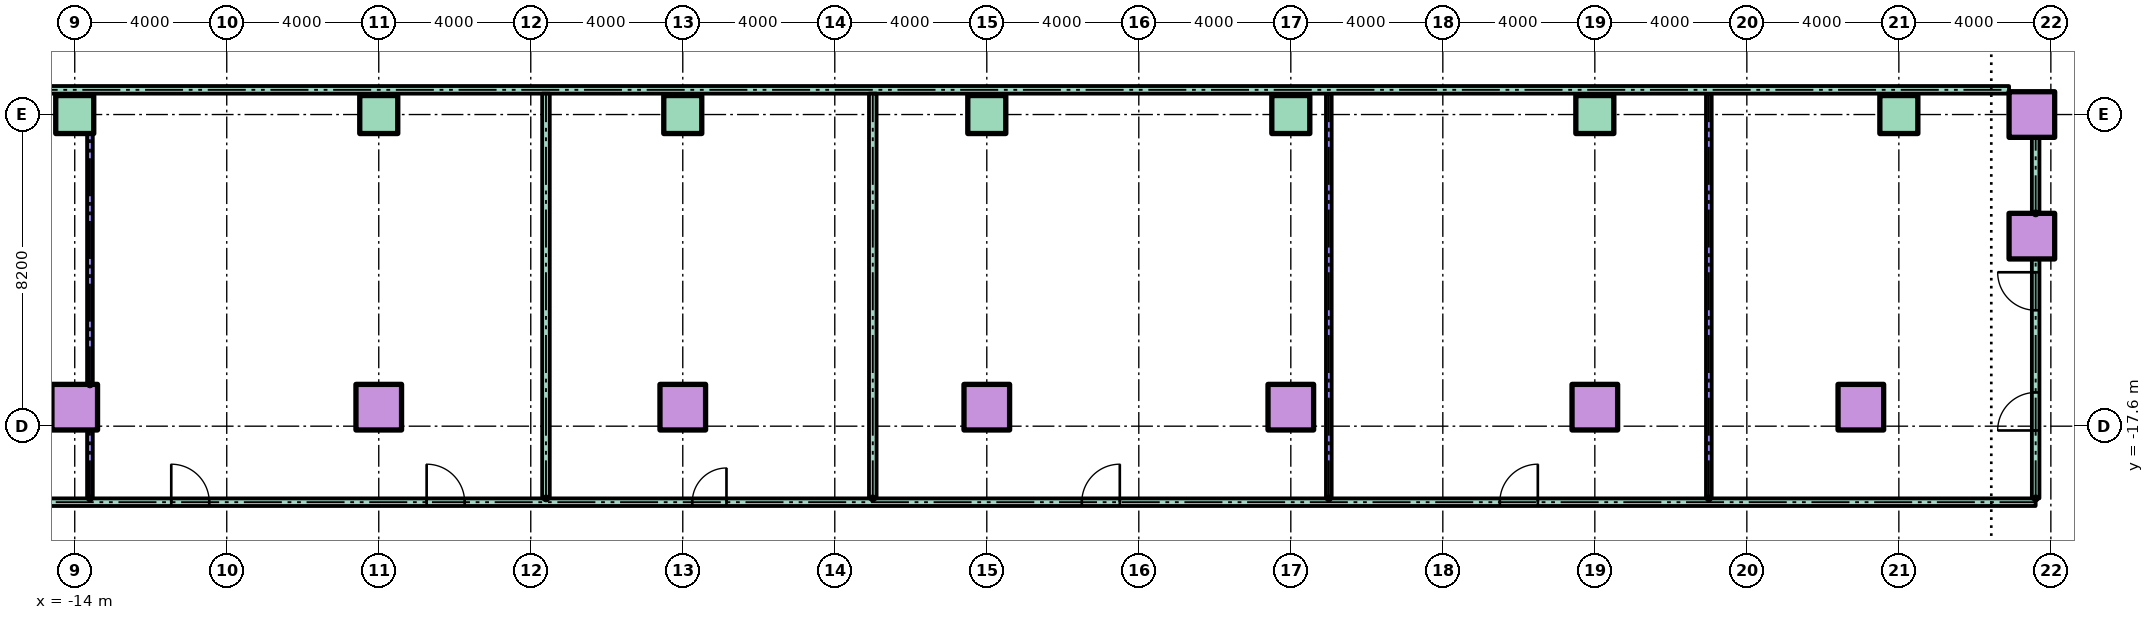
"""IFC4 building model, lengths in metres.
Left out: names, types, materials, properties, quantities, classifications, styles, units other than length and angle.
Written with IfcOpenShell. Run it as: python <this file> out.ifc"""

import sys

from ifc_helpers import new_model, si_unit, direction, frame, frame_2d, origin, origin_2d, place, context, subcontext, project, spatial, rectangle, hollow_rectangle, extrude, element, fill, save


model = new_model("IFC4")
c1 = context("Model", 3, precision=1e-05, world=origin(), true_north=direction((0.0, 1.0)))
c2 = subcontext(c1, "Body", "Model", "MODEL_VIEW")
j1 = project(units=[si_unit("LENGTHUNIT", "METRE"), si_unit("PLANEANGLEUNIT", "RADIAN")], contexts=[c1])
p1 = place(None, origin())
s1 = spatial("IfcSite", under=j1, at=p1, CompositionType="ELEMENT")
p2 = place(p1, origin())
s2 = spatial("IfcBuilding", under=s1, at=p2, CompositionType="ELEMENT")
p3 = place(p2, frame((0.0, 0.0, 14.0)))
s3 = spatial("IfcBuildingStorey", under=s2, at=p3, CompositionType="ELEMENT", Elevation=14.0)
for number, where in (
    (1, (-14.0, -17.1, 0.0)),
    (2, (-6.0, -17.1, 0.0)),
    (3, (2.0, -17.1, 0.0)),
    (4, (10.0, -17.1, 0.0)),
    (5, (18.0, -17.1, 0.0)),
    (6, (26.0, -17.1, 0.0)),
    (7, (33.0, -17.1, 0.0)),
    (8, (37.5, -12.6, 0.0)),
):
    element("IfcColumn", number, at=place(p3, frame(where)), inside=s3, PredefinedType="COLUMN", context=c2, shape_type="SweptSolid", body=[
        extrude(hollow_rectangle(XDim=1.2, YDim=1.2, WallThickness=0.06, at=origin_2d()), origin(), (0.0, 0.0, 1.0), 4.0),
    ])
for number, where in (
    (9, (-14.0, -9.4, 0.0)),
    (10, (-6.0, -9.4, 0.0)),
    (11, (2.0, -9.4, 0.0)),
    (12, (10.0, -9.4, 0.0)),
    (13, (18.0, -9.4, 0.0)),
    (14, (26.0, -9.4, 0.0)),
    (15, (34.0, -9.4, 0.0)),
):
    element("IfcColumn", number, at=place(p3, frame(where)), inside=s3, PredefinedType="COLUMN", context=c2, shape_type="SweptSolid", body=[
        extrude(rectangle(XDim=1.0, YDim=1.0, at=origin_2d()), origin(), (0.0, 0.0, 1.0), 4.0),
    ])
p4 = place(p3, frame((37.5, -9.4, 0.0)))
e16 = element("IfcColumn", 16, at=p4, inside=s3, PredefinedType="COLUMN", context=c2, shape_type="SweptSolid", body=[
    extrude(hollow_rectangle(XDim=1.2, YDim=1.2, WallThickness=0.06, at=origin_2d()), origin(), (0.0, 0.0, 1.0), 4.0),
])
p5 = place(p3, frame((-37.6, -19.6, 0.0)))
e17 = element("IfcWall", 17, at=p5, inside=s3, PredefinedType="PARTITIONING", context=c2, shape_type="SweptSolid", body=[
    extrude(rectangle(XDim=75.2, YDim=0.2, at=frame_2d((37.6, 0.0))), origin(), (0.0, 0.0, 1.0), 3.7),
])
p6 = place(p5, frame((2.14, 0.0, 0.0)))
e18 = element("IfcOpeningElement", 18, at=p6, cuts=e17, PredefinedType="OPENING", context=c2, shape_type="SweptSolid", body=[
    extrude(rectangle(XDim=1.0, YDim=2.1, at=frame_2d((0.5, 1.05))), frame((0.0, 0.11, 0.0), z_axis=(0.0, -1.0, 0.0), x_axis=(1.0, 0.0, 0.0)), (0.0, 0.0, 1.0), 0.22),
])
p7 = place(p5, frame((8.86, 0.0, 0.0)))
e19 = element("IfcOpeningElement", 19, at=p7, cuts=e17, PredefinedType="OPENING", context=c2, shape_type="SweptSolid", body=[
    extrude(rectangle(XDim=1.0, YDim=2.1, at=frame_2d((0.5, 1.05))), frame((0.0, 0.11, 0.0), z_axis=(0.0, -1.0, 0.0), x_axis=(1.0, 0.0, 0.0)), (0.0, 0.0, 1.0), 0.22),
])
p8 = place(p5, frame((14.14, 0.0, 0.0)))
e20 = element("IfcOpeningElement", 20, at=p8, cuts=e17, PredefinedType="OPENING", context=c2, shape_type="SweptSolid", body=[
    extrude(rectangle(XDim=1.0, YDim=2.1, at=frame_2d((0.5, 1.05))), frame((0.0, 0.11, 0.0), z_axis=(0.0, -1.0, 0.0), x_axis=(1.0, 0.0, 0.0)), (0.0, 0.0, 1.0), 0.22),
])
p9 = place(p5, frame((20.86, 0.0, 0.0)))
e21 = element("IfcOpeningElement", 21, at=p9, cuts=e17, PredefinedType="OPENING", context=c2, shape_type="SweptSolid", body=[
    extrude(rectangle(XDim=1.0, YDim=2.1, at=frame_2d((0.5, 1.05))), frame((0.0, 0.11, 0.0), z_axis=(0.0, -1.0, 0.0), x_axis=(1.0, 0.0, 0.0)), (0.0, 0.0, 1.0), 0.22),
])
p10 = place(p5, frame((26.14, 0.0, 0.0)))
e22 = element("IfcOpeningElement", 22, at=p10, cuts=e17, PredefinedType="OPENING", context=c2, shape_type="SweptSolid", body=[
    extrude(rectangle(XDim=1.0, YDim=2.1, at=frame_2d((0.5, 1.05))), frame((0.0, 0.11, 0.0), z_axis=(0.0, -1.0, 0.0), x_axis=(1.0, 0.0, 0.0)), (0.0, 0.0, 1.0), 0.22),
])
p11 = place(p5, frame((32.86, 0.0, 0.0)))
e23 = element("IfcOpeningElement", 23, at=p11, cuts=e17, PredefinedType="OPENING", context=c2, shape_type="SweptSolid", body=[
    extrude(rectangle(XDim=1.0, YDim=2.1, at=frame_2d((0.5, 1.05))), frame((0.0, 0.11, 0.0), z_axis=(0.0, -1.0, 0.0), x_axis=(1.0, 0.0, 0.0)), (0.0, 0.0, 1.0), 0.22),
])
p12 = place(p5, frame((39.85, 0.0, 0.0)))
e24 = element("IfcOpeningElement", 24, at=p12, cuts=e17, PredefinedType="OPENING", context=c2, shape_type="SweptSolid", body=[
    extrude(rectangle(XDim=0.9, YDim=2.1, at=frame_2d((0.45, 1.05))), frame((0.0, 0.11, 0.0), z_axis=(0.0, -1.0, 0.0), x_axis=(1.0, 0.0, 0.0)), (0.0, 0.0, 1.0), 0.22),
])
p13 = place(p5, frame((50.1, 0.0, 0.0)))
e25 = element("IfcOpeningElement", 25, at=p13, cuts=e17, PredefinedType="OPENING", context=c2, shape_type="SweptSolid", body=[
    extrude(rectangle(XDim=1.0, YDim=2.1, at=frame_2d((0.5, 1.05))), frame((0.0, 0.11, 0.0), z_axis=(0.0, -1.0, 0.0), x_axis=(1.0, 0.0, 0.0)), (0.0, 0.0, 1.0), 0.22),
])
p14 = place(p5, frame((61.1, 0.0, 0.0)))
e26 = element("IfcOpeningElement", 26, at=p14, cuts=e17, PredefinedType="OPENING", context=c2, shape_type="SweptSolid", body=[
    extrude(rectangle(XDim=1.0, YDim=2.1, at=frame_2d((0.5, 1.05))), frame((0.0, 0.11, 0.0), z_axis=(0.0, -1.0, 0.0), x_axis=(1.0, 0.0, 0.0)), (0.0, 0.0, 1.0), 0.22),
])
p15 = place(p3, frame((-36.9, -8.75, 0.0)))
e27 = element("IfcWall", 27, at=p15, inside=s3, PredefinedType="PARTITIONING", context=c2, shape_type="SweptSolid", body=[
    extrude(rectangle(XDim=73.8, YDim=0.2, at=frame_2d((36.9, 0.0))), origin(), (0.0, 0.0, 1.0), 3.7),
])
p16 = place(p3, frame((-13.6, -19.5, 0.0), z_axis=(0.0, 0.0, 1.0), x_axis=(0.0, 1.0, 0.0)))
e28 = element("IfcWall", 28, at=p16, inside=s3, PredefinedType="PARTITIONING", context=c2, shape_type="SweptSolid", body=[
    extrude(rectangle(XDim=1.8, YDim=0.15, at=frame_2d((0.9, 0.0))), origin(), (0.0, 0.0, 1.0), 3.7),
])
p17 = place(p3, frame((-13.6, -16.5, 0.0), z_axis=(0.0, 0.0, 1.0), x_axis=(0.0, 1.0, 0.0)))
e29 = element("IfcWall", 29, at=p17, inside=s3, PredefinedType="PARTITIONING", context=c2, shape_type="SweptSolid", body=[
    extrude(rectangle(XDim=6.6, YDim=0.15, at=frame_2d((3.3, 0.0))), origin(), (0.0, 0.0, 1.0), 3.7),
])
for number, where, z_axis, x_axis in (
    (30, (-1.6, -19.5, 0.0), (0.0, 0.0, 1.0), (0.0, 1.0, 0.0)),
    (31, (7.0, -19.5, 0.0), (0.0, 0.0, 1.0), (0.0, 1.0, 0.0)),
):
    element("IfcWall", number, at=place(p3, frame(where, z_axis=z_axis, x_axis=x_axis)), inside=s3, PredefinedType="PARTITIONING", context=c2, shape_type="SweptSolid", body=[
        extrude(rectangle(XDim=10.65, YDim=0.2, at=frame_2d((5.325, 0.0))), origin(), (0.0, 0.0, 1.0), 3.7),
    ])
for number, where, z_axis, x_axis in (
    (32, (19.0, -19.5, 0.0), (0.0, 0.0, 1.0), (0.0, 1.0, 0.0)),
    (33, (29.0, -19.5, 0.0), (0.0, 0.0, 1.0), (0.0, 1.0, 0.0)),
):
    element("IfcWall", number, at=place(p3, frame(where, z_axis=z_axis, x_axis=x_axis)), inside=s3, PredefinedType="PARTITIONING", context=c2, shape_type="SweptSolid", body=[
        extrude(rectangle(XDim=10.65, YDim=0.15, at=frame_2d((5.325, 0.0))), origin(), (0.0, 0.0, 1.0), 3.7),
    ])
p18 = place(p3, frame((37.6, -19.5, 0.0), z_axis=(0.0, 0.0, 1.0), x_axis=(0.0, 1.0, 0.0)))
e34 = element("IfcWall", 34, at=p18, inside=s3, PredefinedType="PARTITIONING", context=c2, shape_type="SweptSolid", body=[
    extrude(rectangle(XDim=6.3, YDim=0.2, at=frame_2d((3.15, 0.0))), origin(), (0.0, 0.0, 1.0), 3.7),
])
p19 = place(p18, frame((1.787, 0.0, 0.0)))
e35 = element("IfcOpeningElement", 35, at=p19, cuts=e34, PredefinedType="OPENING", context=c2, shape_type="SweptSolid", body=[
    extrude(rectangle(XDim=1.0, YDim=2.1, at=frame_2d((0.5, 1.05))), frame((0.0, 0.11, 0.0), z_axis=(0.0, -1.0, 0.0), x_axis=(1.0, 0.0, 0.0)), (0.0, 0.0, 1.0), 0.22),
])
p20 = place(p18, frame((4.95, 0.0, 0.0)))
e36 = element("IfcOpeningElement", 36, at=p20, cuts=e34, PredefinedType="OPENING", context=c2, shape_type="SweptSolid", body=[
    extrude(rectangle(XDim=1.0, YDim=2.1, at=frame_2d((0.5, 1.05))), frame((0.0, 0.11, 0.0), z_axis=(0.0, -1.0, 0.0), x_axis=(1.0, 0.0, 0.0)), (0.0, 0.0, 1.0), 0.22),
])
p21 = place(p3, frame((37.6, -12.0, 0.0), z_axis=(0.0, 0.0, 1.0), x_axis=(0.0, 1.0, 0.0)))
e37 = element("IfcWall", 37, at=p21, inside=s3, PredefinedType="PARTITIONING", context=c2, shape_type="SweptSolid", body=[
    extrude(rectangle(XDim=2.0, YDim=0.2, at=frame_2d((1.0, 0.0))), origin(), (0.0, 0.0, 1.0), 3.7),
])
p22 = place(p10, origin())
e38 = element("IfcDoor", 38, at=p22, inside=s3, OperationType="SINGLE_SWING_LEFT", PredefinedType="DOOR", context=c2, shape_type="SweptSolid", body=[
    extrude(rectangle(XDim=1.0, YDim=2.1, at=frame_2d((0.5, 1.05))), frame((0.0, 0.025, 0.0), z_axis=(0.0, -1.0, 0.0), x_axis=(1.0, 0.0, 0.0)), (0.0, 0.0, 1.0), 0.05),
])
fill(e22, e38)
p23 = place(p11, origin())
e39 = element("IfcDoor", 39, at=p23, inside=s3, OperationType="SINGLE_SWING_LEFT", PredefinedType="DOOR", context=c2, shape_type="SweptSolid", body=[
    extrude(rectangle(XDim=1.0, YDim=2.1, at=frame_2d((0.5, 1.05))), frame((0.0, 0.025, 0.0), z_axis=(0.0, -1.0, 0.0), x_axis=(1.0, 0.0, 0.0)), (0.0, 0.0, 1.0), 0.05),
])
fill(e23, e39)
p24 = place(p12, origin())
e40 = element("IfcDoor", 40, at=p24, inside=s3, OperationType="SINGLE_SWING_RIGHT", PredefinedType="DOOR", context=c2, shape_type="SweptSolid", body=[
    extrude(rectangle(XDim=0.9, YDim=2.1, at=frame_2d((0.45, 1.05))), frame((0.0, 0.025, 0.0), z_axis=(0.0, -1.0, 0.0), x_axis=(1.0, 0.0, 0.0)), (0.0, 0.0, 1.0), 0.05),
])
fill(e24, e40)
p25 = place(p13, origin())
e41 = element("IfcDoor", 41, at=p25, inside=s3, OperationType="SINGLE_SWING_RIGHT", PredefinedType="DOOR", context=c2, shape_type="SweptSolid", body=[
    extrude(rectangle(XDim=1.0, YDim=2.1, at=frame_2d((0.5, 1.05))), frame((0.0, 0.025, 0.0), z_axis=(0.0, -1.0, 0.0), x_axis=(1.0, 0.0, 0.0)), (0.0, 0.0, 1.0), 0.05),
])
fill(e25, e41)
p26 = place(p14, origin())
e42 = element("IfcDoor", 42, at=p26, inside=s3, OperationType="SINGLE_SWING_RIGHT", PredefinedType="DOOR", context=c2, shape_type="SweptSolid", body=[
    extrude(rectangle(XDim=1.0, YDim=2.1, at=frame_2d((0.5, 1.05))), frame((0.0, 0.025, 0.0), z_axis=(0.0, -1.0, 0.0), x_axis=(1.0, 0.0, 0.0)), (0.0, 0.0, 1.0), 0.05),
])
fill(e26, e42)
p27 = place(p19, origin())
e43 = element("IfcDoor", 43, at=p27, inside=s3, OperationType="SINGLE_SWING_LEFT", PredefinedType="DOOR", context=c2, shape_type="SweptSolid", body=[
    extrude(rectangle(XDim=1.0, YDim=2.1, at=frame_2d((0.5, 1.05))), frame((0.0, 0.025, 0.0), z_axis=(0.0, -1.0, 0.0), x_axis=(1.0, 0.0, 0.0)), (0.0, 0.0, 1.0), 0.05),
])
fill(e35, e43)
p28 = place(p20, origin())
e44 = element("IfcDoor", 44, at=p28, inside=s3, OperationType="SINGLE_SWING_RIGHT", PredefinedType="DOOR", context=c2, shape_type="SweptSolid", body=[
    extrude(rectangle(XDim=1.0, YDim=2.1, at=frame_2d((0.5, 1.05))), frame((0.0, 0.025, 0.0), z_axis=(0.0, -1.0, 0.0), x_axis=(1.0, 0.0, 0.0)), (0.0, 0.0, 1.0), 0.05),
])
fill(e36, e44)
save(model, sys.argv[1])
